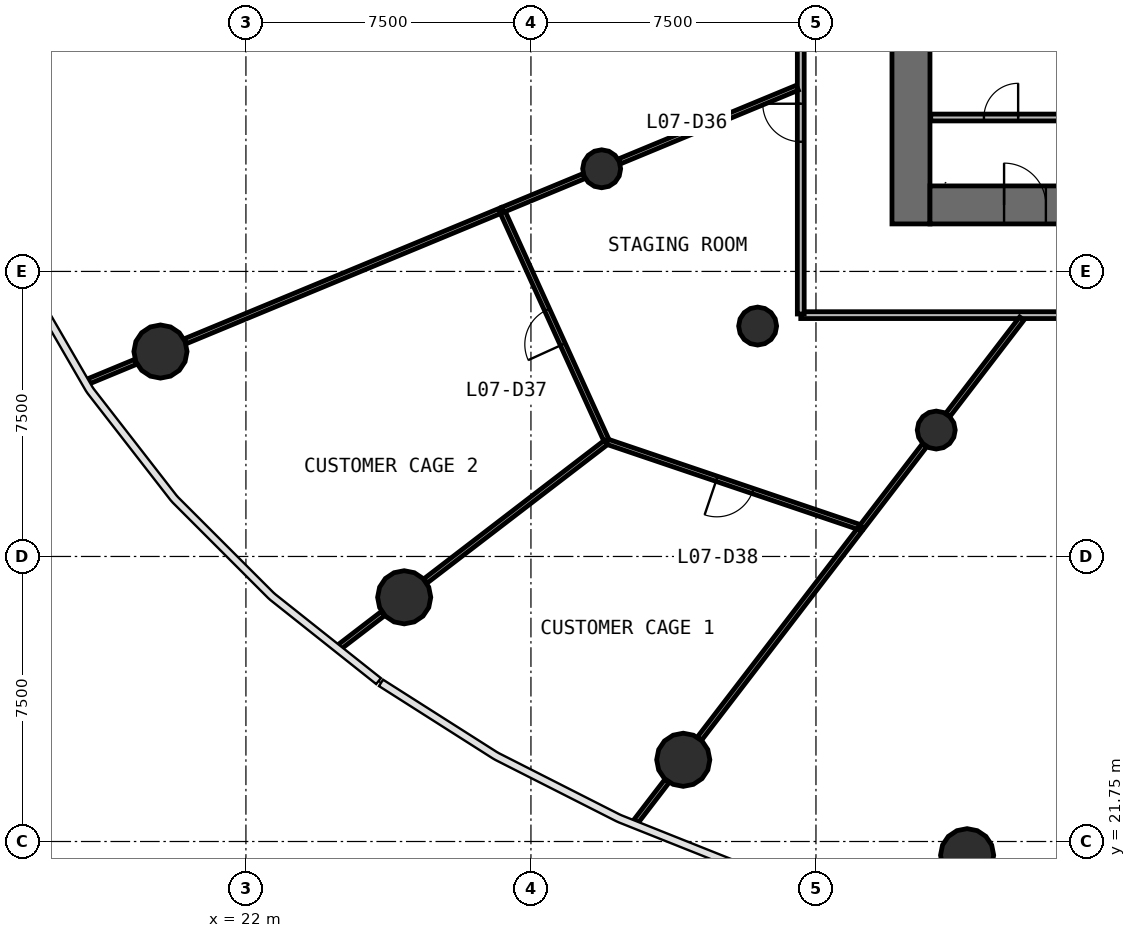
"""IFC4 building model, lengths in metres.
Left out: names, types, materials, properties, quantities, classifications, styles, units other than length and angle.
Written with IfcOpenShell. Run it as: python <this file> out.ifc"""

import sys

from ifc_helpers import new_model, si_unit, direction, frame, frame_2d, origin, origin_2d, place, context, subcontext, project, spatial, rectangle, circle, extrude, source, transform, mapped, element, fill, save


model = new_model("IFC4")
c1 = context("Model", 3, precision=1e-05, world=origin(), true_north=direction((0.0, 1.0)))
c2 = subcontext(c1, "Body", "Model", "MODEL_VIEW")
j1 = project(units=[si_unit("LENGTHUNIT", "METRE"), si_unit("PLANEANGLEUNIT", "RADIAN")], contexts=[c1])
p1 = place(None, origin())
s1 = spatial("IfcSite", under=j1, at=p1, CompositionType="ELEMENT")
p2 = place(p1, origin())
s2 = spatial("IfcBuilding", under=s1, at=p2, CompositionType="ELEMENT")
p3 = place(p2, frame((0.0, 0.0, 31.4)))
s3 = spatial("IfcBuildingStorey", under=s2, at=p3, CompositionType="ELEMENT", Elevation=31.4)
p4 = place(p3, frame((39.5, 58.0, 0.0), z_axis=(0.0, 0.0, 1.0), x_axis=(0.0, -1.0, 0.0)))
e1 = element("IfcWall", 1, at=p4, inside=s3, PredefinedType="SHEAR", context=c2, shape_type="SweptSolid", body=[
    extrude(rectangle(XDim=20.0, YDim=1.0, at=frame_2d((10.0, 0.0))), origin(), (0.0, 0.0, 1.0), 4.4),
])
p5 = place(p4, frame((9.1, 0.0, 0.0)))
e2 = element("IfcOpeningElement", 2, at=p5, cuts=e1, PredefinedType="OPENING", context=c2, shape_type="SweptSolid", body=[
    extrude(rectangle(XDim=1.8, YDim=2.1, at=frame_2d((0.9, 1.05))), frame((0.0, 0.51, 0.0), z_axis=(0.0, -1.0, 0.0), x_axis=(1.0, 0.0, 0.0)), (0.0, 0.0, 1.0), 1.02),
])
p6 = place(p3, frame((40.0, 38.5, 0.0), z_axis=(0.0, 0.0, 1.0), x_axis=(1.0, 0.0, 0.0)))
e3 = element("IfcWall", 3, at=p6, inside=s3, PredefinedType="SHEAR", context=c2, shape_type="SweptSolid", body=[
    extrude(rectangle(XDim=24.0, YDim=1.0, at=frame_2d((12.0, 0.0))), origin(), (0.0, 0.0, 1.0), 4.4),
])
p7 = place(p6, frame((21.45, 0.0, 0.0)))
e4 = element("IfcOpeningElement", 4, at=p7, cuts=e3, PredefinedType="OPENING", context=c2, shape_type="SweptSolid", body=[
    extrude(rectangle(XDim=1.1, YDim=2.1, at=frame_2d((0.55, 1.05))), frame((0.0, 0.51, 0.0), z_axis=(0.0, -1.0, 0.0), x_axis=(1.0, 0.0, 0.0)), (0.0, 0.0, 1.0), 1.02),
])
p8 = place(p6, frame((1.95, 0.0, 0.0)))
e5 = element("IfcOpeningElement", 5, at=p8, cuts=e3, PredefinedType="OPENING", context=c2, shape_type="SweptSolid", body=[
    extrude(rectangle(XDim=1.1, YDim=2.1, at=frame_2d((0.55, 1.05))), frame((0.0, 0.51, 0.0), z_axis=(0.0, -1.0, 0.0), x_axis=(1.0, 0.0, 0.0)), (0.0, 0.0, 1.0), 1.02),
])
m1 = source(origin(), c2, "Body", "SweptSolid", [
    extrude(circle(Radius=0.7, at=origin_2d()), origin(), (0.0, 0.0, 1.0), 4.4),
])
for number, where, z_axis, x_axis in (
    (6, (19.751, 34.642, 0.0), (0.0, 0.0, 1.0), (1.0, 0.0, 0.0)),
    (7, (26.164, 28.176, 0.0), (0.0, 0.0, 1.0), (1.0, 0.0, 0.0)),
    (8, (33.508, 23.9, 0.0), (0.0, 0.0, 1.0), (1.0, 0.0, 0.0)),
    (9, (40.977, 21.389, 0.0), (0.0, 0.0, 1.0), (1.0, 0.0, 0.0)),
):
    element("IfcColumn", number, at=place(p3, frame(where, z_axis=z_axis, x_axis=x_axis)), inside=s3, PredefinedType="COLUMN", context=c2, shape_type="MappedRepresentation", body=[
        mapped(m1, transform((0.0, 0.0, 0.0), scale=1.0)),
    ])
m2 = source(origin(), c2, "Body", "SweptSolid", [
    extrude(circle(Radius=0.5, at=origin_2d()), origin(), (0.0, 0.0, 1.0), 4.4),
])
for number, where, z_axis, x_axis in (
    (10, (31.361, 39.451, 0.0), (0.0, 0.0, 1.0), (1.0, 0.0, 0.0)),
    (11, (35.465, 35.312, 0.0), (0.0, 0.0, 1.0), (1.0, 0.0, 0.0)),
    (12, (40.165, 32.576, 0.0), (0.0, 0.0, 1.0), (1.0, 0.0, 0.0)),
):
    element("IfcColumn", number, at=place(p3, frame(where, z_axis=z_axis, x_axis=x_axis)), inside=s3, PredefinedType="COLUMN", context=c2, shape_type="MappedRepresentation", body=[
        mapped(m2, transform((0.0, 0.0, 0.0), scale=1.0)),
    ])
p9 = place(p3, frame((67.4, 35.6, 0.0), z_axis=(0.0, 0.0, 1.0), x_axis=(-1.0, 0.0, 0.0)))
e13 = element("IfcWall", 13, at=p9, inside=s3, PredefinedType="PARTITIONING", context=c2, shape_type="SweptSolid", body=[
    extrude(rectangle(XDim=30.8, YDim=0.18, at=frame_2d((15.4, 0.0))), origin(), (0.0, 0.0, 1.0), 3.05),
])
p10 = place(p9, frame((14.95, 0.0, 0.0)))
e14 = element("IfcOpeningElement", 14, at=p10, cuts=e13, PredefinedType="OPENING", context=c2, shape_type="SweptSolid", body=[
    extrude(rectangle(XDim=1.0, YDim=2.1, at=frame_2d((0.5, 1.05))), frame((0.0, 0.1, 0.0), z_axis=(0.0, -1.0, 0.0), x_axis=(1.0, 0.0, 0.0)), (0.0, 0.0, 1.0), 0.2),
])
p11 = place(p9, frame((8.95, 0.0, 0.0)))
e15 = element("IfcOpeningElement", 15, at=p11, cuts=e13, PredefinedType="OPENING", context=c2, shape_type="SweptSolid", body=[
    extrude(rectangle(XDim=1.0, YDim=2.1, at=frame_2d((0.5, 1.05))), frame((0.0, 0.1, 0.0), z_axis=(0.0, -1.0, 0.0), x_axis=(1.0, 0.0, 0.0)), (0.0, 0.0, 1.0), 0.2),
])
p12 = place(p3, frame((36.6, 35.63, 0.0), z_axis=(0.0, 0.0, 1.0), x_axis=(0.0, 1.0, 0.0)))
e16 = element("IfcWall", 16, at=p12, inside=s3, PredefinedType="PARTITIONING", context=c2, shape_type="SweptSolid", body=[
    extrude(rectangle(XDim=23.583, YDim=0.18, at=frame_2d((11.791, 0.0))), origin(), (0.0, 0.0, 1.0), 3.05),
])
p13 = place(p12, frame((14.732, 0.0, 0.0)))
e17 = element("IfcOpeningElement", 17, at=p13, cuts=e16, PredefinedType="OPENING", context=c2, shape_type="SweptSolid", body=[
    extrude(rectangle(XDim=1.0, YDim=2.1, at=frame_2d((0.5, 1.05))), frame((0.0, 0.1, 0.0), z_axis=(0.0, -1.0, 0.0), x_axis=(1.0, 0.0, 0.0)), (0.0, 0.0, 1.0), 0.2),
])
p14 = place(p12, frame((11.333, 0.0, 0.0)))
e18 = element("IfcOpeningElement", 18, at=p14, cuts=e16, PredefinedType="OPENING", context=c2, shape_type="SweptSolid", body=[
    extrude(rectangle(XDim=1.0, YDim=2.1, at=frame_2d((0.5, 1.05))), frame((0.0, 0.1, 0.0), z_axis=(0.0, -1.0, 0.0), x_axis=(1.0, 0.0, 0.0)), (0.0, 0.0, 1.0), 0.2),
])
p15 = place(p12, frame((4.532, 0.0, 0.0)))
e19 = element("IfcOpeningElement", 19, at=p15, cuts=e16, PredefinedType="OPENING", context=c2, shape_type="SweptSolid", body=[
    extrude(rectangle(XDim=1.0, YDim=2.1, at=frame_2d((0.5, 1.05))), frame((0.0, 0.1, 0.0), z_axis=(0.0, -1.0, 0.0), x_axis=(1.0, 0.0, 0.0)), (0.0, 0.0, 1.0), 0.2),
])
p16 = place(p3, frame((40.02, 40.8, 0.0), z_axis=(0.0, 0.0, 1.0), x_axis=(1.0, 0.0, 0.0)))
e20 = element("IfcWall", 20, at=p16, inside=s3, PredefinedType="PARTITIONING", context=c2, shape_type="SweptSolid", body=[
    extrude(rectangle(XDim=3.75, YDim=0.18, at=frame_2d((1.875, 0.0))), origin(), (0.0, 0.0, 1.0), 3.95),
])
p17 = place(p16, frame((1.4, 0.0, 0.0)))
e21 = element("IfcOpeningElement", 21, at=p17, cuts=e20, PredefinedType="OPENING", context=c2, shape_type="SweptSolid", body=[
    extrude(rectangle(XDim=0.9, YDim=2.1, at=frame_2d((0.45, 1.05))), frame((0.0, 0.1, 0.0), z_axis=(0.0, -1.0, 0.0), x_axis=(1.0, 0.0, 0.0)), (0.0, 0.0, 1.0), 0.2),
])
p18 = place(p3, frame((28.733, 38.362, 0.0), z_axis=(0.0, 0.0, 1.0), x_axis=(-0.923883179435, -0.382674627794, 0.0)))
e22 = element("IfcWall", 22, at=p18, inside=s3, PredefinedType="PARTITIONING", context=c2, shape_type="SweptSolid", body=[
    extrude(rectangle(XDim=9.017, YDim=0.14, at=frame_2d((4.508, 0.0))), origin(), (0.0, 0.0, 1.0), 3.05),
])
p19 = place(p3, frame((38.193, 30.006, 0.0), z_axis=(0.0, 0.0, 1.0), x_axis=(-0.947190130732, 0.320672506219, 0.0)))
e23 = element("IfcWall", 23, at=p19, inside=s3, PredefinedType="PARTITIONING", context=c2, shape_type="SweptSolid", body=[
    extrude(rectangle(XDim=7.064, YDim=0.14, at=frame_2d((3.532, 0.0))), origin(), (0.0, 0.0, 1.0), 3.05),
])
p20 = place(p19, frame((3.014, 0.0, 0.0)))
e24 = element("IfcOpeningElement", 24, at=p20, cuts=e23, PredefinedType="OPENING", context=c2, shape_type="SweptSolid", body=[
    extrude(rectangle(XDim=1.0, YDim=2.1, at=frame_2d((0.5, 1.05))), frame((0.0, 0.08, 0.0), z_axis=(0.0, -1.0, 0.0), x_axis=(1.0, 0.0, 0.0)), (0.0, 0.0, 1.0), 0.16),
])
p21 = place(p3, frame((38.148, 29.947, 0.0), z_axis=(0.0, 0.0, 1.0), x_axis=(-0.608772297796, -0.793345000259, 0.0)))
e25 = element("IfcWall", 25, at=p21, inside=s3, PredefinedType="PARTITIONING", context=c2, shape_type="SweptSolid", body=[
    extrude(rectangle(XDim=6.918, YDim=0.14, at=frame_2d((3.459, 0.0))), origin(), (0.0, 0.0, 1.0), 3.05),
])
p22 = place(p3, frame((31.49, 32.299, 0.0), z_axis=(0.0, 0.0, 1.0), x_axis=(-0.413875066619, 0.910333691144, 0.0)))
e26 = element("IfcWall", 26, at=p22, inside=s3, PredefinedType="PARTITIONING", context=c2, shape_type="SweptSolid", body=[
    extrude(rectangle(XDim=6.631, YDim=0.14, at=frame_2d((3.315, 0.0))), origin(), (0.0, 0.0, 1.0), 3.05),
])
p23 = place(p22, frame((2.781, 0.0, 0.0)))
e27 = element("IfcOpeningElement", 27, at=p23, cuts=e26, PredefinedType="OPENING", context=c2, shape_type="SweptSolid", body=[
    extrude(rectangle(XDim=1.0, YDim=2.1, at=frame_2d((0.5, 1.05))), frame((0.0, 0.08, 0.0), z_axis=(0.0, -1.0, 0.0), x_axis=(1.0, 0.0, 0.0)), (0.0, 0.0, 1.0), 0.16),
])
p24 = place(p3, frame((31.478, 32.253, 0.0), z_axis=(0.0, 0.0, 1.0), x_axis=(-0.793362398318, -0.608749624177, 0.0)))
e28 = element("IfcWall", 28, at=p24, inside=s3, PredefinedType="PARTITIONING", context=c2, shape_type="SweptSolid", body=[
    extrude(rectangle(XDim=5.993, YDim=0.14, at=frame_2d((2.997, 0.0))), origin(), (0.0, 0.0, 1.0), 3.05),
])
p25 = place(p3, frame((36.51, 41.584, 0.0), z_axis=(0.0, 0.0, 1.0), x_axis=(-0.923890025086, -0.382658100067, 0.0)))
e29 = element("IfcWall", 29, at=p25, inside=s3, PredefinedType="PARTITIONING", context=c2, shape_type="SweptSolid", body=[
    extrude(rectangle(XDim=5.068, YDim=0.14, at=frame_2d((2.534, 0.0))), origin(), (0.0, 0.0, 1.0), 3.05),
])
p26 = place(p3, frame((42.416, 35.51, 0.0), z_axis=(0.0, 0.0, 1.0), x_axis=(-0.60874605662, -0.793365135703, 0.0)))
e30 = element("IfcWall", 30, at=p26, inside=s3, PredefinedType="PARTITIONING", context=c2, shape_type="SweptSolid", body=[
    extrude(rectangle(XDim=3.194, YDim=0.14, at=frame_2d((1.597, 0.0))), origin(), (0.0, 0.0, 1.0), 3.05),
])
p27 = place(p3, frame((39.858, 32.176, 0.0), z_axis=(0.0, 0.0, 1.0), x_axis=(-0.608785764782, -0.793334666202, 0.0)))
e31 = element("IfcWall", 31, at=p27, inside=s3, PredefinedType="PARTITIONING", context=c2, shape_type="SweptSolid", body=[
    extrude(rectangle(XDim=2.705, YDim=0.14, at=frame_2d((1.353, 0.0))), origin(), (0.0, 0.0, 1.0), 3.05),
])
p28 = place(p3, frame((30.894, 39.258, 0.0), z_axis=(0.0, 0.0, 1.0), x_axis=(-0.923850624014, -0.382753216196, 0.0)))
e32 = element("IfcWall", 32, at=p28, inside=s3, PredefinedType="PARTITIONING", context=c2, shape_type="SweptSolid", body=[
    extrude(rectangle(XDim=2.31, YDim=0.14, at=frame_2d((1.155, 0.0))), origin(), (0.0, 0.0, 1.0), 3.05),
])
p29 = place(p3, frame((25.606, 27.747, 0.0), z_axis=(0.0, 0.0, 1.0), x_axis=(-0.793328341426, -0.608794006779, 0.0)))
e33 = element("IfcWall", 33, at=p29, inside=s3, PredefinedType="PARTITIONING", context=c2, shape_type="SweptSolid", body=[
    extrude(rectangle(XDim=1.442, YDim=0.14, at=frame_2d((0.721, 0.0))), origin(), (0.0, 0.0, 1.0), 3.05),
])
p30 = place(p3, frame((33.079, 23.342, 0.0), z_axis=(0.0, 0.0, 1.0), x_axis=(-0.608845512284, -0.793288813845, 0.0)))
e34 = element("IfcWall", 34, at=p30, inside=s3, PredefinedType="PARTITIONING", context=c2, shape_type="SweptSolid", body=[
    extrude(rectangle(XDim=1.337, YDim=0.14, at=frame_2d((0.668, 0.0))), origin(), (0.0, 0.0, 1.0), 3.05),
])
p31 = place(p3, frame((19.1, 34.372, 0.0), z_axis=(0.0, 0.0, 1.0), x_axis=(-0.923887406181, -0.382664423091, 0.0)))
e35 = element("IfcWall", 35, at=p31, inside=s3, PredefinedType="PARTITIONING", context=c2, shape_type="SweptSolid", body=[
    extrude(rectangle(XDim=1.333, YDim=0.14, at=frame_2d((0.667, 0.0))), origin(), (0.0, 0.0, 1.0), 3.05),
])
m3 = source(origin(), c2, "Body", "SweptSolid", [
    extrude(rectangle(XDim=1.1, YDim=2.1, at=frame_2d((0.55, 1.05))), frame((0.0, 0.025, 0.0), z_axis=(0.0, -1.0, 0.0), x_axis=(1.0, 0.0, 0.0)), (0.0, 0.0, 1.0), 0.05),
])
p32 = place(p8, origin())
e36 = element("IfcDoor", 36, at=p32, inside=s3, OperationType="SINGLE_SWING_LEFT", PredefinedType="DOOR", context=c2, shape_type="MappedRepresentation", body=[
    mapped(m3, transform((0.0, 0.0, 0.0), scale=1.0)),
])
fill(e5, e36)
m4 = source(origin(), c2, "Body", "SweptSolid", [
    extrude(rectangle(XDim=1.0, YDim=2.1, at=frame_2d((0.5, 1.05))), frame((0.0, 0.025, 0.0), z_axis=(0.0, -1.0, 0.0), x_axis=(1.0, 0.0, 0.0)), (0.0, 0.0, 1.0), 0.05),
])
p33 = place(p15, origin())
e37 = element("IfcDoor", 37, at=p33, inside=s3, OperationType="SINGLE_SWING_RIGHT", PredefinedType="DOOR", context=c2, shape_type="MappedRepresentation", body=[
    mapped(m4, transform((0.0, 0.0, 0.0), scale=1.0)),
])
fill(e19, e37)
p34 = place(p23, origin())
e38 = element("IfcDoor", 38, at=p34, inside=s3, OperationType="SINGLE_SWING_LEFT", PredefinedType="DOOR", context=c2, shape_type="MappedRepresentation", body=[
    mapped(m4, transform((0.0, 0.0, 0.0), scale=1.0)),
])
fill(e27, e38)
p35 = place(p20, origin())
e39 = element("IfcDoor", 39, at=p35, inside=s3, OperationType="SINGLE_SWING_RIGHT", PredefinedType="DOOR", context=c2, shape_type="MappedRepresentation", body=[
    mapped(m4, transform((0.0, 0.0, 0.0), scale=1.0)),
])
fill(e24, e39)
m5 = source(origin(), c2, "Body", "SweptSolid", [
    extrude(rectangle(XDim=0.9, YDim=2.1, at=frame_2d((0.45, 1.05))), frame((0.0, 0.025, 0.0), z_axis=(0.0, -1.0, 0.0), x_axis=(1.0, 0.0, 0.0)), (0.0, 0.0, 1.0), 0.05),
])
p36 = place(p17, origin())
e40 = element("IfcDoor", 40, at=p36, inside=s3, OperationType="SINGLE_SWING_RIGHT", PredefinedType="DOOR", context=c2, shape_type="MappedRepresentation", body=[
    mapped(m5, transform((0.0, 0.0, 0.0), scale=1.0)),
])
fill(e21, e40)
save(model, sys.argv[1])
